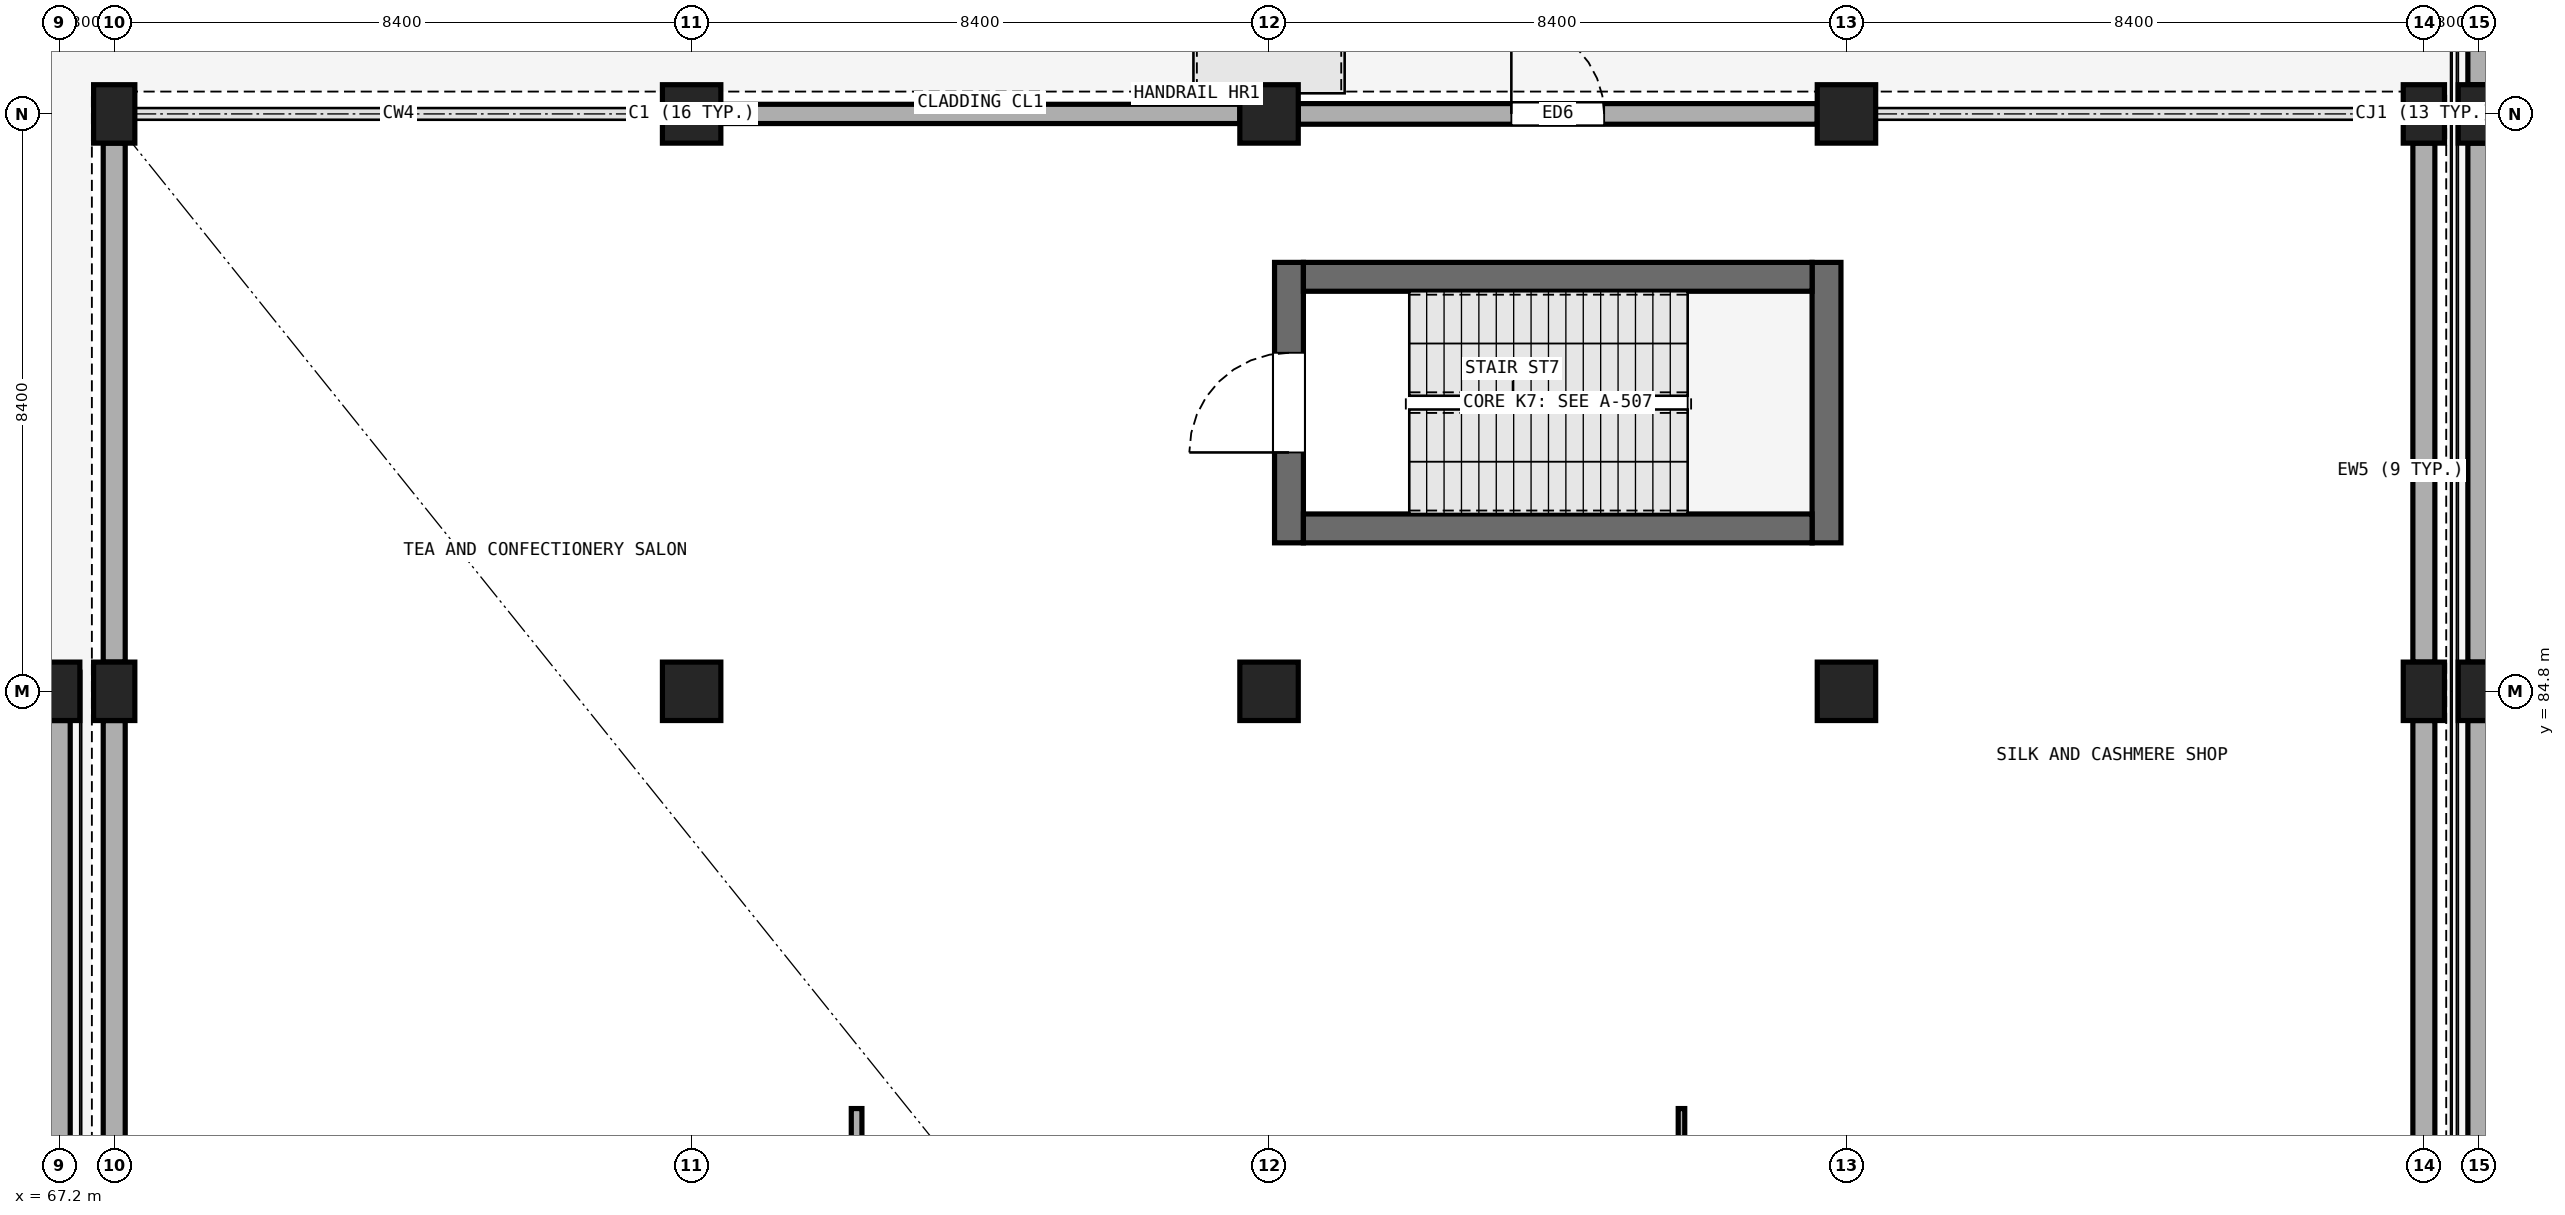
"""IFC4 building model, lengths in metres.
Left out: names, types, materials, properties, quantities, classifications, styles, units other than length and angle.
Written with IfcOpenShell. Run it as: python <this file> out.ifc"""

import sys

from ifc_helpers import new_model, si_unit, direction, frame, frame_2d, origin, origin_2d, place, context, subcontext, project, spatial, rectangle, extrude, element, fill, save


model = new_model("IFC4")
c1 = context("Model", 3, precision=1e-05, world=origin(), true_north=direction((0.0, 1.0)))
c2 = subcontext(c1, "Body", "Model", "MODEL_VIEW")
j1 = project(units=[si_unit("LENGTHUNIT", "METRE"), si_unit("PLANEANGLEUNIT", "RADIAN")], contexts=[c1])
p1 = place(None, origin())
s1 = spatial("IfcSite", under=j1, at=p1, CompositionType="ELEMENT")
p2 = place(p1, origin())
s2 = spatial("IfcBuilding", under=s1, at=p2, CompositionType="ELEMENT")
p3 = place(p2, origin())
s3 = spatial("IfcBuildingStorey", under=s2, at=p3, CompositionType="ELEMENT", Elevation=0.0)
for number, where, z_axis, x_axis in (
    (1, (67.2, 84.8, 0.0), (0.0, 0.0, 1.0), (1.0, 0.0, 0.0)),
    (2, (68.0, 84.8, 0.0), (0.0, 0.0, 1.0), (1.0, 0.0, 0.0)),
):
    element("IfcColumn", number, at=place(p3, frame(where, z_axis=z_axis, x_axis=x_axis)), inside=s3, PredefinedType="COLUMN", context=c2, shape_type="SweptSolid", body=[
        extrude(rectangle(XDim=0.6, YDim=0.85, at=origin_2d()), origin(), (0.0, 0.0, 1.0), 5.4),
    ])
for number, where, z_axis, x_axis in (
    (3, (76.4, 84.8, 0.0), (0.0, 0.0, 1.0), (1.0, 0.0, 0.0)),
    (4, (84.8, 84.8, 0.0), (0.0, 0.0, 1.0), (1.0, 0.0, 0.0)),
    (5, (93.2, 84.8, 0.0), (0.0, 0.0, 1.0), (1.0, 0.0, 0.0)),
):
    element("IfcColumn", number, at=place(p3, frame(where, z_axis=z_axis, x_axis=x_axis)), inside=s3, PredefinedType="COLUMN", context=c2, shape_type="SweptSolid", body=[
        extrude(rectangle(XDim=0.85, YDim=0.85, at=origin_2d()), origin(), (0.0, 0.0, 1.0), 5.4),
    ])
for number, where, z_axis, x_axis in (
    (6, (101.6, 84.8, 0.0), (0.0, 0.0, 1.0), (1.0, 0.0, 0.0)),
    (7, (68.0, 93.2, 0.0), (0.0, 0.0, 1.0), (1.0, 0.0, 0.0)),
):
    element("IfcColumn", number, at=place(p3, frame(where, z_axis=z_axis, x_axis=x_axis)), inside=s3, PredefinedType="COLUMN", context=c2, shape_type="SweptSolid", body=[
        extrude(rectangle(XDim=0.6, YDim=0.85, at=origin_2d()), origin(), (0.0, 0.0, 1.0), 5.4),
    ])
for number, where, z_axis, x_axis in (
    (8, (76.4, 93.2, 0.0), (0.0, 0.0, 1.0), (1.0, 0.0, 0.0)),
    (9, (84.8, 93.2, 0.0), (0.0, 0.0, 1.0), (1.0, 0.0, 0.0)),
    (10, (93.2, 93.2, 0.0), (0.0, 0.0, 1.0), (1.0, 0.0, 0.0)),
):
    element("IfcColumn", number, at=place(p3, frame(where, z_axis=z_axis, x_axis=x_axis)), inside=s3, PredefinedType="COLUMN", context=c2, shape_type="SweptSolid", body=[
        extrude(rectangle(XDim=0.85, YDim=0.85, at=origin_2d()), origin(), (0.0, 0.0, 1.0), 5.4),
    ])
for number, where, z_axis, x_axis in (
    (11, (101.6, 93.2, 0.0), (0.0, 0.0, 1.0), (1.0, 0.0, 0.0)),
    (12, (102.4, 84.8, 0.0), (0.0, 0.0, 1.0), (1.0, 0.0, 0.0)),
    (13, (102.4, 93.2, 0.0), (0.0, 0.0, 1.0), (1.0, 0.0, 0.0)),
):
    element("IfcColumn", number, at=place(p3, frame(where, z_axis=z_axis, x_axis=x_axis)), inside=s3, PredefinedType="COLUMN", context=c2, shape_type="SweptSolid", body=[
        extrude(rectangle(XDim=0.6, YDim=0.85, at=origin_2d()), origin(), (0.0, 0.0, 1.0), 5.4),
    ])
p4 = place(p3, frame((67.2, 76.825, 0.0), z_axis=(0.0, 0.0, 1.0), x_axis=(0.0, 1.0, 0.0)))
e14 = element("IfcWall", 14, at=p4, inside=s3, PredefinedType="SOLIDWALL", context=c2, shape_type="SweptSolid", body=[
    extrude(rectangle(XDim=7.55, YDim=0.32, at=frame_2d((3.775, 0.0))), origin(), (0.0, 0.0, 1.0), 4.35),
])
p5 = place(p3, frame((76.825, 93.2, 0.0), z_axis=(0.0, 0.0, 1.0), x_axis=(1.0, 0.0, 0.0)))
e15 = element("IfcWall", 15, at=p5, inside=s3, PredefinedType="SOLIDWALL", context=c2, shape_type="SweptSolid", body=[
    extrude(rectangle(XDim=7.55, YDim=0.28, at=frame_2d((3.775, 0.0))), origin(), (0.0, 0.0, 1.0), 4.35),
])
p6 = place(p3, frame((85.225, 93.2, 0.0), z_axis=(0.0, 0.0, 1.0), x_axis=(1.0, 0.0, 0.0)))
e16 = element("IfcWall", 16, at=p6, inside=s3, PredefinedType="SOLIDWALL", context=c2, shape_type="SweptSolid", body=[
    extrude(rectangle(XDim=7.55, YDim=0.3, at=frame_2d((3.775, 0.0))), origin(), (0.0, 0.0, 1.0), 4.35),
])
p7 = place(p6, frame((3.1, 0.0, 0.0)))
e17 = element("IfcOpeningElement", 17, at=p7, cuts=e16, PredefinedType="OPENING", context=c2, shape_type="SweptSolid", body=[
    extrude(rectangle(XDim=1.35, YDim=2.2, at=frame_2d((0.675, 1.1))), frame((0.0, 0.16, 0.0), z_axis=(0.0, -1.0, 0.0), x_axis=(1.0, 0.0, 0.0)), (0.0, 0.0, 1.0), 0.32),
])
p8 = place(p3, frame((68.0, 76.825, 0.0), z_axis=(0.0, 0.0, 1.0), x_axis=(0.0, 1.0, 0.0)))
e18 = element("IfcWall", 18, at=p8, inside=s3, PredefinedType="SOLIDWALL", context=c2, shape_type="SweptSolid", body=[
    extrude(rectangle(XDim=7.55, YDim=0.32, at=frame_2d((3.775, 0.0))), origin(), (0.0, 0.0, 1.0), 4.35),
])
p9 = place(p3, frame((68.0, 85.225, 0.0), z_axis=(0.0, 0.0, 1.0), x_axis=(0.0, 1.0, 0.0)))
e19 = element("IfcWall", 19, at=p9, inside=s3, PredefinedType="SOLIDWALL", context=c2, shape_type="SweptSolid", body=[
    extrude(rectangle(XDim=7.55, YDim=0.32, at=frame_2d((3.775, 0.0))), origin(), (0.0, 0.0, 1.0), 4.35),
])
p10 = place(p3, frame((101.6, 76.825, 0.0), z_axis=(0.0, 0.0, 1.0), x_axis=(0.0, 1.0, 0.0)))
e20 = element("IfcWall", 20, at=p10, inside=s3, PredefinedType="SOLIDWALL", context=c2, shape_type="SweptSolid", body=[
    extrude(rectangle(XDim=7.55, YDim=0.32, at=frame_2d((3.775, 0.0))), origin(), (0.0, 0.0, 1.0), 4.35),
])
p11 = place(p3, frame((101.6, 85.225, 0.0), z_axis=(0.0, 0.0, 1.0), x_axis=(0.0, 1.0, 0.0)))
e21 = element("IfcWall", 21, at=p11, inside=s3, PredefinedType="SOLIDWALL", context=c2, shape_type="SweptSolid", body=[
    extrude(rectangle(XDim=7.55, YDim=0.32, at=frame_2d((3.775, 0.0))), origin(), (0.0, 0.0, 1.0), 4.35),
])
p12 = place(p3, frame((102.4, 76.825, 0.0), z_axis=(0.0, 0.0, 1.0), x_axis=(0.0, 1.0, 0.0)))
e22 = element("IfcWall", 22, at=p12, inside=s3, PredefinedType="SOLIDWALL", context=c2, shape_type="SweptSolid", body=[
    extrude(rectangle(XDim=7.55, YDim=0.32, at=frame_2d((3.775, 0.0))), origin(), (0.0, 0.0, 1.0), 4.35),
])
p13 = place(p3, frame((102.4, 85.225, 0.0), z_axis=(0.0, 0.0, 1.0), x_axis=(0.0, 1.0, 0.0)))
e23 = element("IfcWall", 23, at=p13, inside=s3, PredefinedType="SOLIDWALL", context=c2, shape_type="SweptSolid", body=[
    extrude(rectangle(XDim=7.55, YDim=0.32, at=frame_2d((3.775, 0.0))), origin(), (0.0, 0.0, 1.0), 4.35),
])
p14 = place(p3, frame((102.4, 93.625, 0.0), z_axis=(0.0, 0.0, 1.0), x_axis=(0.0, 1.0, 0.0)))
e24 = element("IfcWall", 24, at=p14, inside=s3, PredefinedType="SOLIDWALL", context=c2, shape_type="SweptSolid", body=[
    extrude(rectangle(XDim=7.55, YDim=0.32, at=frame_2d((3.775, 0.0))), origin(), (0.0, 0.0, 1.0), 4.35),
])
p15 = place(p3, frame((85.09, 86.96, 0.0), z_axis=(0.0, 0.0, 1.0), x_axis=(0.0, 1.0, 0.0)))
e25 = element("IfcWall", 25, at=p15, inside=s3, PredefinedType="SHEAR", context=c2, shape_type="SweptSolid", body=[
    extrude(rectangle(XDim=4.08, YDim=0.42, at=frame_2d((2.04, 0.0))), origin(), (0.0, 0.0, 1.0), 5.1),
])
p16 = place(p15, frame((1.315, 0.0, 0.0)))
e26 = element("IfcOpeningElement", 26, at=p16, cuts=e25, PredefinedType="OPENING", context=c2, shape_type="SweptSolid", body=[
    extrude(rectangle(XDim=1.45, YDim=2.2, at=frame_2d((0.725, 1.1))), frame((0.0, 0.22, 0.0), z_axis=(0.0, -1.0, 0.0), x_axis=(1.0, 0.0, 0.0)), (0.0, 0.0, 1.0), 0.44),
])
p17 = place(p3, frame((92.91, 86.96, 0.0), z_axis=(0.0, 0.0, 1.0), x_axis=(0.0, 1.0, 0.0)))
e27 = element("IfcWall", 27, at=p17, inside=s3, PredefinedType="SHEAR", context=c2, shape_type="SweptSolid", body=[
    extrude(rectangle(XDim=4.08, YDim=0.42, at=frame_2d((2.04, 0.0))), origin(), (0.0, 0.0, 1.0), 5.1),
])
for number, where, z_axis, x_axis in (
    (28, (85.3, 87.17, 0.0), (0.0, 0.0, 1.0), (1.0, 0.0, 0.0)),
    (29, (85.3, 90.83, 0.0), (0.0, 0.0, 1.0), (1.0, 0.0, 0.0)),
):
    element("IfcWall", number, at=place(p3, frame(where, z_axis=z_axis, x_axis=x_axis)), inside=s3, PredefinedType="SHEAR", context=c2, shape_type="SweptSolid", body=[
        extrude(rectangle(XDim=7.4, YDim=0.42, at=frame_2d((3.7, 0.0))), origin(), (0.0, 0.0, 1.0), 5.1),
    ])
p18 = place(p3, frame((78.8, 67.07, 0.0), z_axis=(0.0, 0.0, 1.0), x_axis=(0.0, 1.0, 0.0)))
e30 = element("IfcWall", 30, at=p18, inside=s3, PredefinedType="PARTITIONING", context=c2, shape_type="SweptSolid", body=[
    extrude(rectangle(XDim=11.66, YDim=0.155, at=frame_2d((5.83, 0.0))), origin(), (0.0, 0.0, 1.0), 4.35),
])
p19 = place(p18, frame((5.35, 0.0, 0.0)))
e31 = element("IfcOpeningElement", 31, at=p19, cuts=e30, PredefinedType="OPENING", context=c2, shape_type="SweptSolid", body=[
    extrude(rectangle(XDim=0.96, YDim=2.34, at=frame_2d((0.48, 1.17))), frame((0.0, 0.087, 0.0), z_axis=(0.0, -1.0, 0.0), x_axis=(1.0, 0.0, 0.0)), (0.0, 0.0, 1.0), 0.175),
])
p20 = place(p3, frame((90.8, 67.07, 0.0), z_axis=(0.0, 0.0, 1.0), x_axis=(0.0, 1.0, 0.0)))
e32 = element("IfcWall", 32, at=p20, inside=s3, PredefinedType="PARTITIONING", context=c2, shape_type="SweptSolid", body=[
    extrude(rectangle(XDim=11.66, YDim=0.095, at=frame_2d((5.83, 0.0))), origin(), (0.0, 0.0, 1.0), 4.35),
])
p21 = place(p20, frame((5.31, 0.0, 0.0)))
e33 = element("IfcOpeningElement", 33, at=p21, cuts=e32, PredefinedType="OPENING", context=c2, shape_type="SweptSolid", body=[
    extrude(rectangle(XDim=1.04, YDim=2.22, at=frame_2d((0.52, 1.11))), frame((0.0, 0.057, 0.0), z_axis=(0.0, -1.0, 0.0), x_axis=(1.0, 0.0, 0.0)), (0.0, 0.0, 1.0), 0.115),
])
p22 = place(p7, origin())
e34 = element("IfcDoor", 34, at=p22, inside=s3, OperationType="SINGLE_SWING_LEFT", PredefinedType="DOOR", context=c2, shape_type="SweptSolid", body=[
    extrude(rectangle(XDim=1.35, YDim=2.2, at=frame_2d((0.675, 1.1))), frame((0.0, 0.025, 0.0), z_axis=(0.0, -1.0, 0.0), x_axis=(1.0, 0.0, 0.0)), (0.0, 0.0, 1.0), 0.05),
])
fill(e17, e34)
p23 = place(p16, origin())
e35 = element("IfcDoor", 35, at=p23, inside=s3, OperationType="SINGLE_SWING_LEFT", PredefinedType="DOOR", context=c2, shape_type="SweptSolid", body=[
    extrude(rectangle(XDim=1.45, YDim=2.2, at=frame_2d((0.725, 1.1))), frame((0.0, 0.025, 0.0), z_axis=(0.0, -1.0, 0.0), x_axis=(1.0, 0.0, 0.0)), (0.0, 0.0, 1.0), 0.05),
])
fill(e26, e35)
save(model, sys.argv[1])
